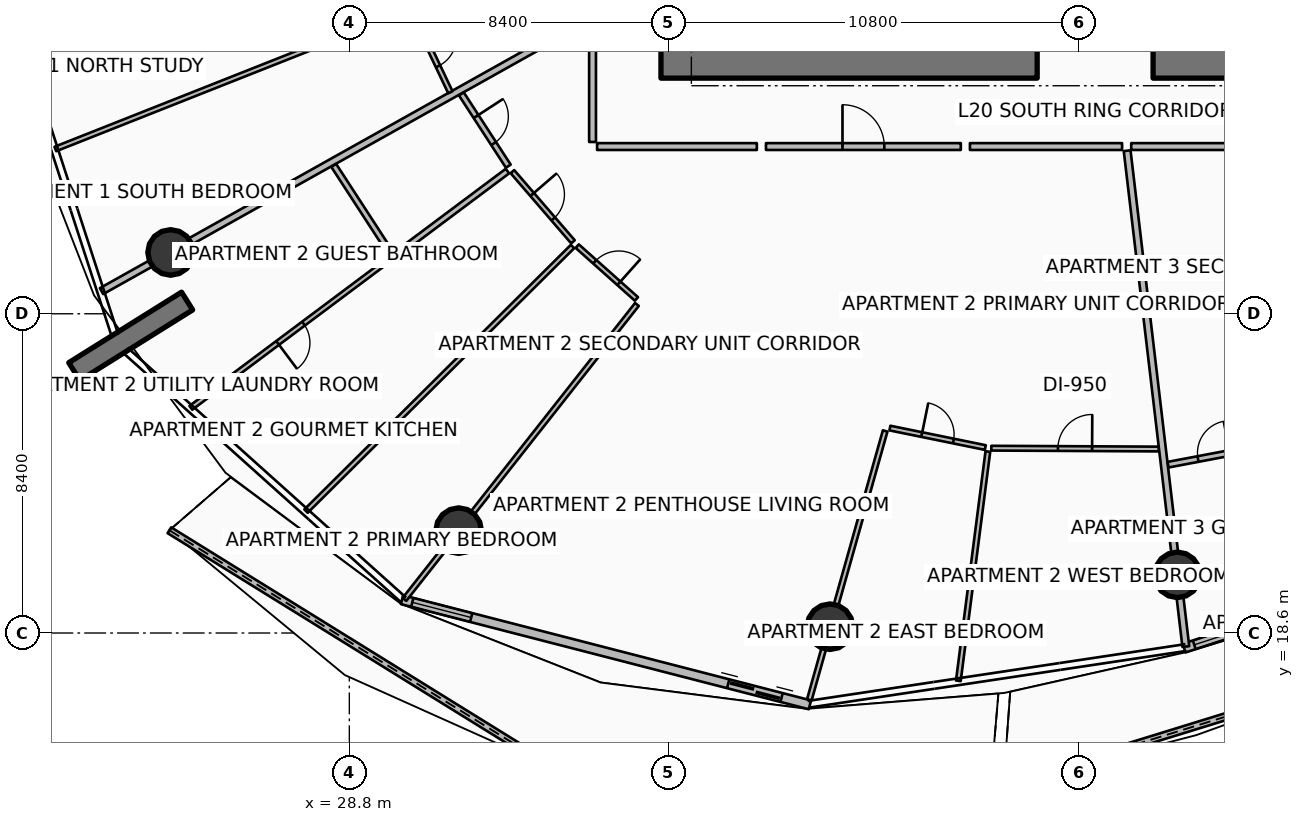
"""IFC4 building model, lengths in metres.
Left out: names, types, materials, properties, quantities, classifications, styles, units other than length and angle.
Written with IfcOpenShell. Run it as: python <this file> out.ifc"""

import sys

from ifc_helpers import new_model, si_unit, direction, frame, frame_2d, origin, origin_2d, place, context, subcontext, project, spatial, polyline, rectangle, circle, outline, extrude, element, fill, save


model = new_model("IFC4")
c1 = context("Model", 3, precision=1e-05, world=origin(), true_north=direction((0.0, 1.0)))
c2 = subcontext(c1, "Body", "Model", "MODEL_VIEW")
j1 = project(units=[si_unit("LENGTHUNIT", "METRE"), si_unit("PLANEANGLEUNIT", "RADIAN")], contexts=[c1])
p1 = place(None, origin())
s1 = spatial("IfcSite", under=j1, at=p1, CompositionType="ELEMENT")
p2 = place(p1, origin())
s2 = spatial("IfcBuilding", under=s1, at=p2, CompositionType="ELEMENT")
p3 = place(p2, frame((0.0, 0.0, 82.65)))
s3 = spatial("IfcBuildingStorey", under=s2, at=p3, CompositionType="ELEMENT", Elevation=82.65)
p4 = place(p3, frame((37.0, 33.6, 0.0), z_axis=(0.0, 0.0, 1.0), x_axis=(1.0, 0.0, 0.0)))
e1 = element("IfcWall", 1, at=p4, inside=s3, PredefinedType="SHEAR", context=c2, shape_type="SweptSolid", body=[
    extrude(rectangle(XDim=9.9, YDim=0.8, at=frame_2d((4.95, 0.0))), origin(), (0.0, 0.0, 1.0), 3.75),
])
p5 = place(p3, frame((49.95, 33.6, 0.0), z_axis=(0.0, 0.0, 1.0), x_axis=(1.0, 0.0, 0.0)))
e2 = element("IfcWall", 2, at=p5, inside=s3, PredefinedType="SHEAR", context=c2, shape_type="SweptSolid", body=[
    extrude(rectangle(XDim=9.9, YDim=0.8, at=frame_2d((4.95, 0.0))), origin(), (0.0, 0.0, 1.0), 3.75),
])
p6 = place(p3, frame((24.531, 27.335, 0.0), z_axis=(0.0, 0.0, 1.0), x_axis=(-0.848053161125, -0.529911158502, 0.0)))
e3 = element("IfcWall", 3, at=p6, inside=s3, PredefinedType="SOLIDWALL", context=c2, shape_type="SweptSolid", body=[
    extrude(rectangle(XDim=3.5, YDim=0.55, at=frame_2d((1.75, 0.0))), origin(), (0.0, 0.0, 1.0), 3.75),
])
for number, where, z_axis, x_axis in (
    (4, (24.097, 28.614, 0.0), (0.0, 0.0, 1.0), (1.0, 0.0, 0.0)),
    (5, (31.677, 21.294, 0.0), (0.0, 0.0, 1.0), (1.0, 0.0, 0.0)),
    (6, (41.447, 18.766, 0.0), (0.0, 0.0, 1.0), (1.0, 0.0, 0.0)),
    (7, (50.588, 20.131, 0.0), (0.0, 0.0, 1.0), (1.0, 0.0, 0.0)),
):
    element("IfcColumn", number, at=place(p3, frame(where, z_axis=z_axis, x_axis=x_axis)), inside=s3, PredefinedType="COLUMN", context=c2, shape_type="SweptSolid", body=[
        extrude(circle(Radius=0.6, at=origin_2d()), origin(), (0.0, 0.0, 1.0), 3.5),
    ])
p7 = place(p3, frame((24.065, 21.303, 0.0), z_axis=(0.0, 0.0, 1.0), x_axis=(0.850140442318, -0.526556006836, 0.0)))
e8 = element("IfcWall", 8, at=p7, inside=s3, PredefinedType="PARAPET", context=c2, shape_type="SweptSolid", body=[
    extrude(outline(polyline([(0.0, 0.0), (11.852, 0.0), (11.852, 1.832), (5.926, 1.696), (0.0, 1.497), (0.0, 0.0)])), frame((0.0, 0.09, 0.0), z_axis=(0.0, -1.0, 0.0), x_axis=(1.0, 0.0, 0.0)), (0.0, 0.0, 1.0), 0.18),
])
p8 = place(p3, frame((46.011, 14.594, 0.0), z_axis=(0.0, 0.0, 1.0), x_axis=(0.955530222606, 0.294893190301, 0.0)))
e9 = element("IfcWall", 9, at=p8, inside=s3, PredefinedType="PARAPET", context=c2, shape_type="SweptSolid", body=[
    extrude(outline(polyline([(0.0, 0.0), (10.241, 0.0), (10.241, 1.348), (5.121, 1.562), (0.0, 1.747), (0.0, 0.0)])), frame((0.0, 0.09, 0.0), z_axis=(0.0, -1.0, 0.0), x_axis=(1.0, 0.0, 0.0)), (0.0, 0.0, 1.0), 0.18),
])
p9 = place(p3, frame((30.186, 19.477, 0.0), z_axis=(0.0, 0.0, 1.0), x_axis=(0.968356180858, -0.249572248045, 0.0)))
e10 = element("IfcWall", 10, at=p9, inside=s3, PredefinedType="SOLIDWALL", context=c2, shape_type="SweptSolid", body=[
    extrude(rectangle(XDim=11.084, YDim=0.24, at=frame_2d((5.542, 0.0))), origin(), (0.0, 0.0, 1.0), 2.45),
])
p10 = place(p9, frame((8.865, 0.0, 0.0)))
e11 = element("IfcOpeningElement", 11, at=p10, cuts=e10, PredefinedType="OPENING", context=c2, shape_type="SweptSolid", body=[
    extrude(rectangle(XDim=1.45, YDim=2.15, at=frame_2d((0.725, 1.075))), frame((0.0, 0.13, 0.0), z_axis=(0.0, -1.0, 0.0), x_axis=(1.0, 0.0, 0.0)), (0.0, 0.0, 1.0), 0.26),
])
p11 = place(p9, frame((0.28, 0.0, 0.65)))
e12 = element("IfcOpeningElement", 12, at=p11, cuts=e10, PredefinedType="OPENING", context=c2, shape_type="SweptSolid", body=[
    extrude(rectangle(XDim=1.6, YDim=1.5, at=frame_2d((0.8, 0.75))), frame((0.0, 0.13, 0.0), z_axis=(0.0, -1.0, 0.0), x_axis=(1.0, 0.0, 0.0)), (0.0, 0.0, 1.0), 0.26),
])
p12 = place(p3, frame((50.767, 18.203, 0.0), z_axis=(0.0, 0.0, 1.0), x_axis=(0.951052494852, 0.30902937083, 0.0)))
e13 = element("IfcWall", 13, at=p12, inside=s3, PredefinedType="SOLIDWALL", context=c2, shape_type="SweptSolid", body=[
    extrude(rectangle(XDim=9.444, YDim=0.24, at=frame_2d((4.722, 0.0))), origin(), (0.0, 0.0, 1.0), 2.45),
])
p13 = place(p12, frame((7.224, 0.0, 0.0)))
e14 = element("IfcOpeningElement", 14, at=p13, cuts=e13, PredefinedType="OPENING", context=c2, shape_type="SweptSolid", body=[
    extrude(rectangle(XDim=1.45, YDim=2.15, at=frame_2d((0.725, 1.075))), frame((0.0, 0.13, 0.0), z_axis=(0.0, -1.0, 0.0), x_axis=(1.0, 0.0, 0.0)), (0.0, 0.0, 1.0), 0.26),
])
p14 = place(p12, frame((0.28, 0.0, 0.65)))
e15 = element("IfcOpeningElement", 15, at=p14, cuts=e13, PredefinedType="OPENING", context=c2, shape_type="SweptSolid", body=[
    extrude(rectangle(XDim=1.6, YDim=1.5, at=frame_2d((0.8, 0.75))), frame((0.0, 0.13, 0.0), z_axis=(0.0, -1.0, 0.0), x_axis=(1.0, 0.0, 0.0)), (0.0, 0.0, 1.0), 0.26),
])
p15 = place(p3, frame((35.104, 34.778, 0.0), z_axis=(0.0, 0.0, 1.0), x_axis=(-0.872490437896, -0.488631185845, 0.0)))
e16 = element("IfcWall", 16, at=p15, inside=s3, PredefinedType="PARTITIONING", context=c2, shape_type="SweptSolid", body=[
    extrude(rectangle(XDim=14.699, YDim=0.18, at=frame_2d((7.35, 0.0))), origin(), (0.0, 0.0, 1.0), 2.94),
])
p16 = place(p3, frame((49.268, 31.291, 0.0), z_axis=(0.0, 0.0, 1.0), x_axis=(0.117532311618, -0.993069058891, 0.0)))
e17 = element("IfcWall", 17, at=p16, inside=s3, PredefinedType="PARTITIONING", context=c2, shape_type="SweptSolid", body=[
    extrude(rectangle(XDim=13.138, YDim=0.18, at=frame_2d((6.569, 0.0))), origin(), (0.0, 0.0, 1.0), 2.94),
])
p17 = place(p3, frame((30.326, 35.002, 0.0), z_axis=(0.0, 0.0, 1.0), x_axis=(-0.929777602375, -0.368121732748, 0.0)))
e18 = element("IfcWall", 18, at=p17, inside=s3, PredefinedType="PARTITIONING", context=c2, shape_type="SweptSolid", body=[
    extrude(rectangle(XDim=9.961, YDim=0.125, at=frame_2d((4.98, 0.0))), origin(), (0.0, 0.0, 1.0), 2.94),
])
p18 = place(p3, frame((30.444, 34.963, 0.0), z_axis=(0.0, 0.0, 1.0), x_axis=(0.429404357622, -0.903112339443, 0.0)))
e19 = element("IfcWall", 19, at=p18, inside=s3, PredefinedType="PARTITIONING", context=c2, shape_type="SweptSolid", body=[
    extrude(rectangle(XDim=2.364, YDim=0.125, at=frame_2d((1.182, 0.0))), origin(), (0.0, 0.0, 1.0), 2.94),
])
p19 = place(p18, frame((0.757, 0.0, 0.0)))
e20 = element("IfcOpeningElement", 20, at=p19, cuts=e19, PredefinedType="OPENING", context=c2, shape_type="SweptSolid", body=[
    extrude(rectangle(XDim=0.85, YDim=2.06, at=frame_2d((0.425, 1.03))), frame((0.0, 0.073, 0.0), z_axis=(0.0, -1.0, 0.0), x_axis=(1.0, 0.0, 0.0)), (0.0, 0.0, 1.0), 0.145),
])
p20 = place(p3, frame((39.764, 31.4, 0.0), z_axis=(0.0, 0.0, 1.0), x_axis=(1.0, 0.0, 0.0)))
e21 = element("IfcWall", 21, at=p20, inside=s3, PredefinedType="PARTITIONING", context=c2, shape_type="SweptSolid", body=[
    extrude(rectangle(XDim=5.127, YDim=0.18, at=frame_2d((2.563, 0.0))), origin(), (0.0, 0.0, 1.0), 2.94),
])
p21 = place(p20, frame((2.013, 0.0, 0.0)))
e22 = element("IfcOpeningElement", 22, at=p21, cuts=e21, PredefinedType="OPENING", context=c2, shape_type="SweptSolid", body=[
    extrude(rectangle(XDim=1.1, YDim=2.1, at=frame_2d((0.55, 1.05))), frame((0.0, 0.1, 0.0), z_axis=(0.0, -1.0, 0.0), x_axis=(1.0, 0.0, 0.0)), (0.0, 0.0, 1.0), 0.2),
])
p22 = place(p3, frame((35.2, 34.712, 0.0), z_axis=(0.0, 0.0, 1.0), x_axis=(0.0, -1.0, 0.0)))
e23 = element("IfcWall", 23, at=p22, inside=s3, PredefinedType="PARTITIONING", context=c2, shape_type="SweptSolid", body=[
    extrude(rectangle(XDim=3.192, YDim=0.18, at=frame_2d((1.596, 0.0))), origin(), (0.0, 0.0, 1.0), 2.94),
])
p23 = place(p3, frame((35.32, 31.4, 0.0), z_axis=(0.0, 0.0, 1.0), x_axis=(1.0, 0.0, 0.0)))
e24 = element("IfcWall", 24, at=p23, inside=s3, PredefinedType="PARTITIONING", context=c2, shape_type="SweptSolid", body=[
    extrude(rectangle(XDim=4.204, YDim=0.18, at=frame_2d((2.102, 0.0))), origin(), (0.0, 0.0, 1.0), 2.94),
])
p24 = place(p3, frame((36.368, 27.245, 0.0), z_axis=(0.0, 0.0, 1.0), x_axis=(-0.619096231027, -0.785315132115, 0.0)))
e25 = element("IfcWall", 25, at=p24, inside=s3, PredefinedType="PARTITIONING", context=c2, shape_type="SweptSolid", body=[
    extrude(rectangle(XDim=9.882, YDim=0.125, at=frame_2d((4.941, 0.0))), origin(), (0.0, 0.0, 1.0), 2.94),
])
p25 = place(p3, frame((31.748, 32.784, 0.0), z_axis=(0.0, 0.0, 1.0), x_axis=(0.544920213423, -0.838487901524, 0.0)))
e26 = element("IfcWall", 26, at=p25, inside=s3, PredefinedType="PARTITIONING", context=c2, shape_type="SweptSolid", body=[
    extrude(rectangle(XDim=2.267, YDim=0.15, at=frame_2d((1.134, 0.0))), origin(), (0.0, 0.0, 1.0), 2.94),
])
p26 = place(p25, frame((0.708, 0.0, 0.0)))
e27 = element("IfcOpeningElement", 27, at=p26, cuts=e26, PredefinedType="OPENING", context=c2, shape_type="SweptSolid", body=[
    extrude(rectangle(XDim=0.85, YDim=2.06, at=frame_2d((0.425, 1.03))), frame((0.0, 0.085, 0.0), z_axis=(0.0, -1.0, 0.0), x_axis=(1.0, 0.0, 0.0)), (0.0, 0.0, 1.0), 0.17),
])
p27 = place(p3, frame((28.389, 30.903, 0.0), z_axis=(0.0, 0.0, 1.0), x_axis=(0.544849096032, -0.838534115318, 0.0)))
e28 = element("IfcWall", 28, at=p27, inside=s3, PredefinedType="PARTITIONING", context=c2, shape_type="SweptSolid", body=[
    extrude(rectangle(XDim=2.773, YDim=0.15, at=frame_2d((1.387, 0.0))), origin(), (0.0, 0.0, 1.0), 2.94),
])
p28 = place(p3, frame((32.961, 30.754, 0.0), z_axis=(0.0, 0.0, 1.0), x_axis=(-0.800889069655, -0.598812740435, 0.0)))
e29 = element("IfcWall", 29, at=p28, inside=s3, PredefinedType="PARTITIONING", context=c2, shape_type="SweptSolid", body=[
    extrude(rectangle(XDim=3.72, YDim=0.15, at=frame_2d((1.86, 0.0))), origin(), (0.0, 0.0, 1.0), 2.94),
])
p29 = place(p3, frame((29.877, 28.448, 0.0), z_axis=(0.0, 0.0, 1.0), x_axis=(-0.800862229892, -0.598848635911, 0.0)))
e30 = element("IfcWall", 30, at=p29, inside=s3, PredefinedType="PARTITIONING", context=c2, shape_type="SweptSolid", body=[
    extrude(rectangle(XDim=6.552, YDim=0.125, at=frame_2d((3.276, 0.0))), origin(), (0.0, 0.0, 1.0), 2.94),
])
p30 = place(p29, frame((2.851, 0.0, 0.0)))
e31 = element("IfcOpeningElement", 31, at=p30, cuts=e30, PredefinedType="OPENING", context=c2, shape_type="SweptSolid", body=[
    extrude(rectangle(XDim=0.85, YDim=2.06, at=frame_2d((0.425, 1.03))), frame((0.0, 0.073, 0.0), z_axis=(0.0, -1.0, 0.0), x_axis=(1.0, 0.0, 0.0)), (0.0, 0.0, 1.0), 0.145),
])
p31 = place(p3, frame((34.673, 28.769, 0.0), z_axis=(0.0, 0.0, 1.0), x_axis=(-0.709671596246, -0.70453262911, 0.0)))
e32 = element("IfcWall", 32, at=p31, inside=s3, PredefinedType="PARTITIONING", context=c2, shape_type="SweptSolid", body=[
    extrude(rectangle(XDim=9.882, YDim=0.125, at=frame_2d((4.941, 0.0))), origin(), (0.0, 0.0, 1.0), 2.94),
])
p32 = place(p3, frame((33.092, 30.74, 0.0), z_axis=(0.0, 0.0, 1.0), x_axis=(0.653244508484, -0.757147021479, 0.0)))
e33 = element("IfcWall", 33, at=p32, inside=s3, PredefinedType="PARTITIONING", context=c2, shape_type="SweptSolid", body=[
    extrude(rectangle(XDim=2.439, YDim=0.125, at=frame_2d((1.219, 0.0))), origin(), (0.0, 0.0, 1.0), 2.94),
])
p33 = place(p32, frame((0.794, 0.0, 0.0)))
e34 = element("IfcOpeningElement", 34, at=p33, cuts=e33, PredefinedType="OPENING", context=c2, shape_type="SweptSolid", body=[
    extrude(rectangle(XDim=0.85, YDim=2.06, at=frame_2d((0.425, 1.03))), frame((0.0, 0.073, 0.0), z_axis=(0.0, -1.0, 0.0), x_axis=(1.0, 0.0, 0.0)), (0.0, 0.0, 1.0), 0.145),
])
p34 = place(p3, frame((34.797, 28.78, 0.0), z_axis=(0.0, 0.0, 1.0), x_axis=(0.74635037564, -0.665553241132, 0.0)))
e35 = element("IfcWall", 35, at=p34, inside=s3, PredefinedType="PARTITIONING", context=c2, shape_type="SweptSolid", body=[
    extrude(rectangle(XDim=2.088, YDim=0.125, at=frame_2d((1.044, 0.0))), origin(), (0.0, 0.0, 1.0), 2.94),
])
p35 = place(p34, frame((0.619, 0.0, 0.0)))
e36 = element("IfcOpeningElement", 36, at=p35, cuts=e35, PredefinedType="OPENING", context=c2, shape_type="SweptSolid", body=[
    extrude(rectangle(XDim=0.85, YDim=2.06, at=frame_2d((0.425, 1.03))), frame((0.0, 0.073, 0.0), z_axis=(0.0, -1.0, 0.0), x_axis=(1.0, 0.0, 0.0)), (0.0, 0.0, 1.0), 0.145),
])
p36 = place(p3, frame((45.131, 31.4, 0.0), z_axis=(0.0, 0.0, 1.0), x_axis=(1.0, 0.0, 0.0)))
e37 = element("IfcWall", 37, at=p36, inside=s3, PredefinedType="PARTITIONING", context=c2, shape_type="SweptSolid", body=[
    extrude(rectangle(XDim=4.004, YDim=0.18, at=frame_2d((2.002, 0.0))), origin(), (0.0, 0.0, 1.0), 2.94),
])
p37 = place(p3, frame((42.9, 23.917, 0.0), z_axis=(0.0, 0.0, 1.0), x_axis=(-0.27145069635, -0.962452346587, 0.0)))
e38 = element("IfcWall", 38, at=p37, inside=s3, PredefinedType="PARTITIONING", context=c2, shape_type="SweptSolid", body=[
    extrude(rectangle(XDim=7.349, YDim=0.125, at=frame_2d((3.674, 0.0))), origin(), (0.0, 0.0, 1.0), 2.94),
])
p38 = place(p3, frame((45.603, 23.375, 0.0), z_axis=(0.0, 0.0, 1.0), x_axis=(-0.127689849516, -0.991814147071, 0.0)))
e39 = element("IfcWall", 39, at=p38, inside=s3, PredefinedType="PARTITIONING", context=c2, shape_type="SweptSolid", body=[
    extrude(rectangle(XDim=6.082, YDim=0.125, at=frame_2d((3.041, 0.0))), origin(), (0.0, 0.0, 1.0), 2.94),
])
p39 = place(p3, frame((43.025, 23.993, 0.0), z_axis=(0.0, 0.0, 1.0), x_axis=(0.97978119615, -0.200072006215, 0.0)))
e40 = element("IfcWall", 40, at=p39, inside=s3, PredefinedType="PARTITIONING", context=c2, shape_type="SweptSolid", body=[
    extrude(rectangle(XDim=2.562, YDim=0.125, at=frame_2d((1.281, 0.0))), origin(), (0.0, 0.0, 1.0), 2.94),
])
p40 = place(p39, frame((0.856, 0.0, 0.0)))
e41 = element("IfcOpeningElement", 41, at=p40, cuts=e40, PredefinedType="OPENING", context=c2, shape_type="SweptSolid", body=[
    extrude(rectangle(XDim=0.85, YDim=2.06, at=frame_2d((0.425, 1.03))), frame((0.0, 0.073, 0.0), z_axis=(0.0, -1.0, 0.0), x_axis=(1.0, 0.0, 0.0)), (0.0, 0.0, 1.0), 0.145),
])
p41 = place(p3, frame((45.694, 23.463, 0.0), z_axis=(0.0, 0.0, 1.0), x_axis=(0.999986986287, -0.005101691496, 0.0)))
e42 = element("IfcWall", 42, at=p41, inside=s3, PredefinedType="PARTITIONING", context=c2, shape_type="SweptSolid", body=[
    extrude(rectangle(XDim=4.403, YDim=0.125, at=frame_2d((2.201, 0.0))), origin(), (0.0, 0.0, 1.0), 2.94),
])
p42 = place(p41, frame((1.751, 0.0, 0.0)))
e43 = element("IfcOpeningElement", 43, at=p42, cuts=e42, PredefinedType="OPENING", context=c2, shape_type="SweptSolid", body=[
    extrude(rectangle(XDim=0.9, YDim=2.08, at=frame_2d((0.45, 1.04))), frame((0.0, 0.073, 0.0), z_axis=(0.0, -1.0, 0.0), x_axis=(1.0, 0.0, 0.0)), (0.0, 0.0, 1.0), 0.145),
])
p43 = place(p3, frame((49.375, 31.4, 0.0), z_axis=(0.0, 0.0, 1.0), x_axis=(1.0, 0.0, 0.0)))
e44 = element("IfcWall", 44, at=p43, inside=s3, PredefinedType="PARTITIONING", context=c2, shape_type="SweptSolid", body=[
    extrude(rectangle(XDim=4.442, YDim=0.18, at=frame_2d((2.221, 0.0))), origin(), (0.0, 0.0, 1.0), 2.94),
])
p44 = place(p3, frame((50.346, 23.029, 0.0), z_axis=(0.0, 0.0, 1.0), x_axis=(0.982576637083, 0.185857881885, 0.0)))
e45 = element("IfcWall", 45, at=p44, inside=s3, PredefinedType="PARTITIONING", context=c2, shape_type="SweptSolid", body=[
    extrude(rectangle(XDim=2.451, YDim=0.15, at=frame_2d((1.226, 0.0))), origin(), (0.0, 0.0, 1.0), 2.94),
])
p45 = place(p44, frame((0.801, 0.0, 0.0)))
e46 = element("IfcOpeningElement", 46, at=p45, cuts=e45, PredefinedType="OPENING", context=c2, shape_type="SweptSolid", body=[
    extrude(rectangle(XDim=0.85, YDim=2.06, at=frame_2d((0.425, 1.03))), frame((0.0, 0.085, 0.0), z_axis=(0.0, -1.0, 0.0), x_axis=(1.0, 0.0, 0.0)), (0.0, 0.0, 1.0), 0.17),
])
p46 = place(p10, origin())
e47 = element("IfcDoor", 47, at=p46, inside=s3, OperationType="DOUBLE_DOOR_SLIDING", PredefinedType="DOOR", context=c2, shape_type="SweptSolid", body=[
    extrude(rectangle(XDim=1.45, YDim=2.15, at=frame_2d((0.725, 1.075))), frame((0.0, 0.025, 0.0), z_axis=(0.0, -1.0, 0.0), x_axis=(1.0, 0.0, 0.0)), (0.0, 0.0, 1.0), 0.05),
])
fill(e11, e47)
p47 = place(p11, origin())
e48 = element("IfcWindow", 48, at=p47, inside=s3, PartitioningType="SINGLE_PANEL", PredefinedType="WINDOW", context=c2, shape_type="SweptSolid", body=[
    extrude(rectangle(XDim=1.6, YDim=1.5, at=frame_2d((0.8, 0.75))), frame((0.0, 0.03, 0.0), z_axis=(0.0, -1.0, 0.0), x_axis=(1.0, 0.0, 0.0)), (0.0, 0.0, 1.0), 0.06),
])
fill(e12, e48)
p48 = place(p14, origin())
e49 = element("IfcWindow", 49, at=p48, inside=s3, PartitioningType="SINGLE_PANEL", PredefinedType="WINDOW", context=c2, shape_type="SweptSolid", body=[
    extrude(rectangle(XDim=1.6, YDim=1.5, at=frame_2d((0.8, 0.75))), frame((0.0, 0.03, 0.0), z_axis=(0.0, -1.0, 0.0), x_axis=(1.0, 0.0, 0.0)), (0.0, 0.0, 1.0), 0.06),
])
fill(e15, e49)
p49 = place(p19, origin())
e50 = element("IfcDoor", 50, at=p49, inside=s3, OperationType="SINGLE_SWING_LEFT", PredefinedType="DOOR", context=c2, shape_type="SweptSolid", body=[
    extrude(rectangle(XDim=0.85, YDim=2.06, at=frame_2d((0.425, 1.03))), frame((0.0, 0.025, 0.0), z_axis=(0.0, -1.0, 0.0), x_axis=(1.0, 0.0, 0.0)), (0.0, 0.0, 1.0), 0.05),
])
fill(e20, e50)
p50 = place(p21, origin())
e51 = element("IfcDoor", 51, at=p50, inside=s3, OperationType="SINGLE_SWING_LEFT", PredefinedType="DOOR", context=c2, shape_type="SweptSolid", body=[
    extrude(rectangle(XDim=1.1, YDim=2.1, at=frame_2d((0.55, 1.05))), frame((0.0, 0.025, 0.0), z_axis=(0.0, -1.0, 0.0), x_axis=(1.0, 0.0, 0.0)), (0.0, 0.0, 1.0), 0.05),
])
fill(e22, e51)
p51 = place(p26, origin())
e52 = element("IfcDoor", 52, at=p51, inside=s3, OperationType="SINGLE_SWING_LEFT", PredefinedType="DOOR", context=c2, shape_type="SweptSolid", body=[
    extrude(rectangle(XDim=0.85, YDim=2.06, at=frame_2d((0.425, 1.03))), frame((0.0, 0.025, 0.0), z_axis=(0.0, -1.0, 0.0), x_axis=(1.0, 0.0, 0.0)), (0.0, 0.0, 1.0), 0.05),
])
fill(e27, e52)
p52 = place(p30, origin())
e53 = element("IfcDoor", 53, at=p52, inside=s3, OperationType="SINGLE_SWING_RIGHT", PredefinedType="DOOR", context=c2, shape_type="SweptSolid", body=[
    extrude(rectangle(XDim=0.85, YDim=2.06, at=frame_2d((0.425, 1.03))), frame((0.0, 0.025, 0.0), z_axis=(0.0, -1.0, 0.0), x_axis=(1.0, 0.0, 0.0)), (0.0, 0.0, 1.0), 0.05),
])
fill(e31, e53)
p53 = place(p33, origin())
e54 = element("IfcDoor", 54, at=p53, inside=s3, OperationType="SINGLE_SWING_LEFT", PredefinedType="DOOR", context=c2, shape_type="SweptSolid", body=[
    extrude(rectangle(XDim=0.85, YDim=2.06, at=frame_2d((0.425, 1.03))), frame((0.0, 0.025, 0.0), z_axis=(0.0, -1.0, 0.0), x_axis=(1.0, 0.0, 0.0)), (0.0, 0.0, 1.0), 0.05),
])
fill(e34, e54)
p54 = place(p35, origin())
e55 = element("IfcDoor", 55, at=p54, inside=s3, OperationType="SINGLE_SWING_RIGHT", PredefinedType="DOOR", context=c2, shape_type="SweptSolid", body=[
    extrude(rectangle(XDim=0.85, YDim=2.06, at=frame_2d((0.425, 1.03))), frame((0.0, 0.025, 0.0), z_axis=(0.0, -1.0, 0.0), x_axis=(1.0, 0.0, 0.0)), (0.0, 0.0, 1.0), 0.05),
])
fill(e36, e55)
p55 = place(p40, origin())
e56 = element("IfcDoor", 56, at=p55, inside=s3, OperationType="SINGLE_SWING_LEFT", PredefinedType="DOOR", context=c2, shape_type="SweptSolid", body=[
    extrude(rectangle(XDim=0.85, YDim=2.06, at=frame_2d((0.425, 1.03))), frame((0.0, 0.025, 0.0), z_axis=(0.0, -1.0, 0.0), x_axis=(1.0, 0.0, 0.0)), (0.0, 0.0, 1.0), 0.05),
])
fill(e41, e56)
p56 = place(p42, origin())
e57 = element("IfcDoor", 57, at=p56, inside=s3, OperationType="SINGLE_SWING_RIGHT", PredefinedType="DOOR", context=c2, shape_type="SweptSolid", body=[
    extrude(rectangle(XDim=0.9, YDim=2.08, at=frame_2d((0.45, 1.04))), frame((0.0, 0.025, 0.0), z_axis=(0.0, -1.0, 0.0), x_axis=(1.0, 0.0, 0.0)), (0.0, 0.0, 1.0), 0.05),
])
fill(e43, e57)
p57 = place(p45, origin())
e58 = element("IfcDoor", 58, at=p57, inside=s3, OperationType="SINGLE_SWING_RIGHT", PredefinedType="DOOR", context=c2, shape_type="SweptSolid", body=[
    extrude(rectangle(XDim=0.85, YDim=2.06, at=frame_2d((0.425, 1.03))), frame((0.0, 0.025, 0.0), z_axis=(0.0, -1.0, 0.0), x_axis=(1.0, 0.0, 0.0)), (0.0, 0.0, 1.0), 0.05),
])
fill(e46, e58)
save(model, sys.argv[1])
